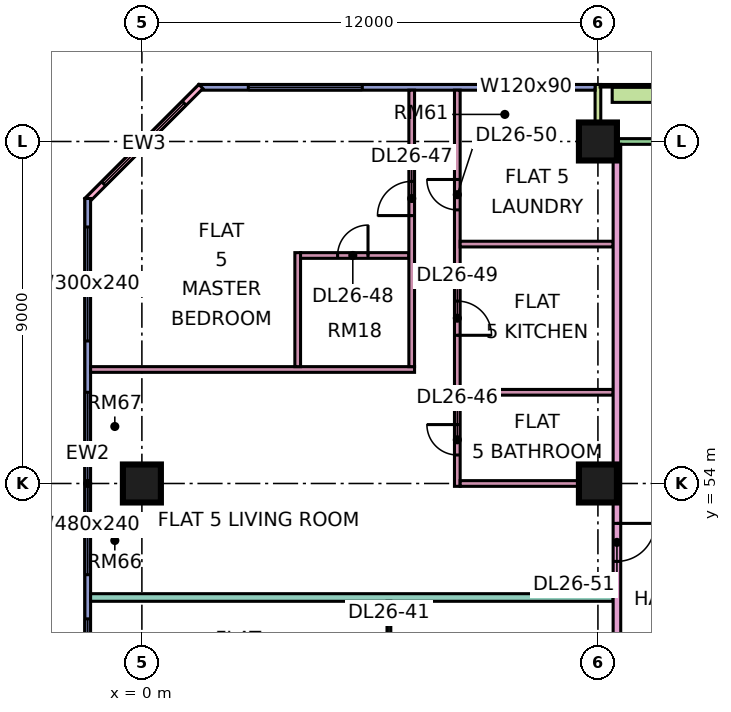
"""IFC4 building model, lengths in metres.
Left out: names, types, materials, properties, quantities, classifications, styles, units other than length and angle.
Written with IfcOpenShell. Run it as: python <this file> out.ifc"""

import sys

from ifc_helpers import new_model, si_unit, direction, frame, frame_2d, origin, origin_2d, place, context, subcontext, project, spatial, rectangle, extrude, element, fill, save


model = new_model("IFC4")
c1 = context("Model", 3, precision=1e-05, world=origin(), true_north=direction((0.0, 1.0)))
c2 = subcontext(c1, "Body", "Model", "MODEL_VIEW")
j1 = project(units=[si_unit("LENGTHUNIT", "METRE"), si_unit("PLANEANGLEUNIT", "RADIAN")], contexts=[c1])
p1 = place(None, origin())
s1 = spatial("IfcSite", under=j1, at=p1, CompositionType="ELEMENT")
p2 = place(p1, origin())
s2 = spatial("IfcBuilding", under=s1, at=p2, CompositionType="ELEMENT")
p3 = place(p2, frame((0.0, 0.0, 114.4)))
s3 = spatial("IfcBuildingStorey", under=s2, at=p3, CompositionType="ELEMENT", Elevation=114.4)
for number, where, z_axis, x_axis in (
    (1, (0.0, 54.0, 0.0), (0.0, 0.0, 1.0), (1.0, 0.0, 0.0)),
    (2, (12.0, 54.0, 0.0), (0.0, 0.0, 1.0), (1.0, 0.0, 0.0)),
    (3, (12.0, 63.0, 0.0), (0.0, 0.0, 1.0), (1.0, 0.0, 0.0)),
):
    element("IfcColumn", number, at=place(p3, frame(where, z_axis=z_axis, x_axis=x_axis)), inside=s3, PredefinedType="COLUMN", context=c2, shape_type="SweptSolid", body=[
        extrude(rectangle(XDim=1.0, YDim=1.0, at=origin_2d()), origin(), (0.0, 0.0, 1.0), 3.75),
    ])
p4 = place(p3, frame((22.425, 63.0, 0.0), z_axis=(0.0, 0.0, 1.0), x_axis=(-1.0, 0.0, 0.0)))
e4 = element("IfcWall", 4, at=p4, inside=s3, PredefinedType="SOLIDWALL", context=c2, shape_type="SweptSolid", body=[
    extrude(rectangle(XDim=10.35, YDim=0.15, at=frame_2d((5.175, 0.0))), origin(), (0.0, 0.0, 1.0), 3.35),
])
p5 = place(p4, frame((0.562, 0.0, 0.45)))
e5 = element("IfcOpeningElement", 5, at=p5, cuts=e4, PredefinedType="OPENING", context=c2, shape_type="SweptSolid", body=[
    extrude(rectangle(XDim=1.8, YDim=2.4, at=frame_2d((0.9, 1.2))), frame((0.0, 0.085, 0.0), z_axis=(0.0, -1.0, 0.0), x_axis=(1.0, 0.0, 0.0)), (0.0, 0.0, 1.0), 0.17),
])
p6 = place(p4, frame((3.975, 0.0, 0.0)))
e6 = element("IfcOpeningElement", 6, at=p6, cuts=e4, PredefinedType="OPENING", context=c2, shape_type="SweptSolid", body=[
    extrude(rectangle(XDim=1.8, YDim=2.4, at=frame_2d((0.9, 1.2))), frame((0.0, 0.085, 0.0), z_axis=(0.0, -1.0, 0.0), x_axis=(1.0, 0.0, 0.0)), (0.0, 0.0, 1.0), 0.17),
])
p7 = place(p3, frame((12.0, 64.5, 0.0), z_axis=(0.0, 0.0, 1.0), x_axis=(0.0, -1.0, 0.0)))
e7 = element("IfcWall", 7, at=p7, inside=s3, PredefinedType="SOLIDWALL", context=c2, shape_type="SweptSolid", body=[
    extrude(rectangle(XDim=1.5, YDim=0.15, at=frame_2d((0.75, 0.0))), origin(), (0.0, 0.0, 1.0), 3.35),
])
p8 = place(p3, frame((11.925, 64.425, 0.0), z_axis=(0.0, 0.0, 1.0), x_axis=(-1.0, 0.0, 0.0)))
e8 = element("IfcWall", 8, at=p8, inside=s3, PredefinedType="SOLIDWALL", context=c2, shape_type="SweptSolid", body=[
    extrude(rectangle(XDim=10.425, YDim=0.15, at=frame_2d((5.212, 0.0))), origin(), (0.0, 0.0, 1.0), 3.35),
])
p9 = place(p8, frame((1.212, 0.0, 1.7)))
e9 = element("IfcOpeningElement", 9, at=p9, cuts=e8, PredefinedType="OPENING", context=c2, shape_type="SweptSolid", body=[
    extrude(rectangle(XDim=1.2, YDim=0.9, at=frame_2d((0.6, 0.45))), frame((0.0, 0.085, 0.0), z_axis=(0.0, -1.0, 0.0), x_axis=(1.0, 0.0, 0.0)), (0.0, 0.0, 1.0), 0.17),
])
p10 = place(p8, frame((6.125, 0.0, 0.45)))
e10 = element("IfcOpeningElement", 10, at=p10, cuts=e8, PredefinedType="OPENING", context=c2, shape_type="SweptSolid", body=[
    extrude(rectangle(XDim=3.0, YDim=2.4, at=frame_2d((1.5, 1.2))), frame((0.0, 0.085, 0.0), z_axis=(0.0, -1.0, 0.0), x_axis=(1.0, 0.0, 0.0)), (0.0, 0.0, 1.0), 0.17),
])
p11 = place(p3, frame((1.553, 64.447, 0.0), z_axis=(0.0, 0.0, 1.0), x_axis=(-0.707106781187, -0.707106781187, 0.0)))
e11 = element("IfcWall", 11, at=p11, inside=s3, PredefinedType="SOLIDWALL", context=c2, shape_type="SweptSolid", body=[
    extrude(rectangle(XDim=4.243, YDim=0.15, at=frame_2d((2.121, 0.0))), origin(), (0.0, 0.0, 1.0), 3.35),
])
p12 = place(p11, frame((0.621, 0.0, 0.45)))
e12 = element("IfcOpeningElement", 12, at=p12, cuts=e11, PredefinedType="OPENING", context=c2, shape_type="SweptSolid", body=[
    extrude(rectangle(XDim=3.0, YDim=2.4, at=frame_2d((1.5, 1.2))), frame((0.0, 0.085, 0.0), z_axis=(0.0, -1.0, 0.0), x_axis=(1.0, 0.0, 0.0)), (0.0, 0.0, 1.0), 0.17),
])
p13 = place(p3, frame((-1.425, 61.5, 0.0), z_axis=(0.0, 0.0, 1.0), x_axis=(0.0, -1.0, 0.0)))
e13 = element("IfcWall", 13, at=p13, inside=s3, PredefinedType="SOLIDWALL", context=c2, shape_type="SweptSolid", body=[
    extrude(rectangle(XDim=13.425, YDim=0.15, at=frame_2d((6.712, 0.0))), origin(), (0.0, 0.0, 1.0), 3.35),
])
p14 = place(p13, frame((0.75, 0.0, 0.45)))
e14 = element("IfcOpeningElement", 14, at=p14, cuts=e13, PredefinedType="OPENING", context=c2, shape_type="SweptSolid", body=[
    extrude(rectangle(XDim=3.0, YDim=2.4, at=frame_2d((1.5, 1.2))), frame((0.0, 0.085, 0.0), z_axis=(0.0, -1.0, 0.0), x_axis=(1.0, 0.0, 0.0)), (0.0, 0.0, 1.0), 0.17),
])
p15 = place(p13, frame((5.1, 0.0, 0.45)))
e15 = element("IfcOpeningElement", 15, at=p15, cuts=e13, PredefinedType="OPENING", context=c2, shape_type="SweptSolid", body=[
    extrude(rectangle(XDim=4.8, YDim=2.4, at=frame_2d((2.4, 1.2))), frame((0.0, 0.085, 0.0), z_axis=(0.0, -1.0, 0.0), x_axis=(1.0, 0.0, 0.0)), (0.0, 0.0, 1.0), 0.17),
])
p16 = place(p13, frame((11.062, 0.0, 0.45)))
e16 = element("IfcOpeningElement", 16, at=p16, cuts=e13, PredefinedType="OPENING", context=c2, shape_type="SweptSolid", body=[
    extrude(rectangle(XDim=1.8, YDim=2.4, at=frame_2d((0.9, 1.2))), frame((0.0, 0.085, 0.0), z_axis=(0.0, -1.0, 0.0), x_axis=(1.0, 0.0, 0.0)), (0.0, 0.0, 1.0), 0.17),
])
p17 = place(p3, frame((22.125, 64.229, 0.0), z_axis=(0.0, 0.0, 1.0), x_axis=(-1.0, 0.0, 0.0)))
e17 = element("IfcWall", 17, at=p17, inside=s3, PredefinedType="SOLIDWALL", context=c2, shape_type="SweptSolid", body=[
    extrude(rectangle(XDim=9.75, YDim=0.4, at=frame_2d((4.875, 0.0))), origin(), (0.0, 0.0, 1.0), 0.7),
])
p18 = place(p3, frame((-1.35, 51.0, 0.0), z_axis=(0.0, 0.0, 1.0), x_axis=(1.0, 0.0, 0.0)))
e18 = element("IfcWall", 18, at=p18, inside=s3, PredefinedType="PARTITIONING", context=c2, shape_type="SweptSolid", body=[
    extrude(rectangle(XDim=13.75, YDim=0.2, at=frame_2d((6.875, 0.0))), origin(), (0.0, 0.0, 1.0), 3.35),
])
p19 = place(p3, frame((-1.35, 57.0, 0.0), z_axis=(0.0, 0.0, 1.0), x_axis=(1.0, 0.0, 0.0)))
e19 = element("IfcWall", 19, at=p19, inside=s3, PredefinedType="PARTITIONING", context=c2, shape_type="SweptSolid", body=[
    extrude(rectangle(XDim=8.525, YDim=0.15, at=frame_2d((4.263, 0.0))), origin(), (0.0, 0.0, 1.0), 3.35),
])
p20 = place(p3, frame((4.1, 57.075, 0.0), z_axis=(0.0, 0.0, 1.0), x_axis=(0.0, 1.0, 0.0)))
e20 = element("IfcWall", 20, at=p20, inside=s3, PredefinedType="PARTITIONING", context=c2, shape_type="SweptSolid", body=[
    extrude(rectangle(XDim=3.0, YDim=0.15, at=frame_2d((1.5, 0.0))), origin(), (0.0, 0.0, 1.0), 3.35),
])
p21 = place(p3, frame((4.175, 60.0, 0.0), z_axis=(0.0, 0.0, 1.0), x_axis=(1.0, 0.0, 0.0)))
e21 = element("IfcWall", 21, at=p21, inside=s3, PredefinedType="PARTITIONING", context=c2, shape_type="SweptSolid", body=[
    extrude(rectangle(XDim=2.85, YDim=0.15, at=frame_2d((1.425, 0.0))), origin(), (0.0, 0.0, 1.0), 3.35),
])
p22 = place(p21, frame((0.975, 0.0, 0.0)))
e22 = element("IfcOpeningElement", 22, at=p22, cuts=e21, PredefinedType="OPENING", context=c2, shape_type="SweptSolid", body=[
    extrude(rectangle(XDim=0.8, YDim=2.1, at=frame_2d((0.4, 1.05))), frame((0.0, 0.085, 0.0), z_axis=(0.0, -1.0, 0.0), x_axis=(1.0, 0.0, 0.0)), (0.0, 0.0, 1.0), 0.17),
])
p23 = place(p3, frame((6.5, 41.95, 0.0), z_axis=(0.0, 0.0, 1.0), x_axis=(0.0, 1.0, 0.0)))
e23 = element("IfcWall", 23, at=p23, inside=s3, PredefinedType="PARTITIONING", context=c2, shape_type="SweptSolid", body=[
    extrude(rectangle(XDim=8.95, YDim=0.1, at=frame_2d((4.475, 0.0))), origin(), (0.0, 0.0, 1.0), 3.35),
])
p24 = place(p23, frame((1.1, 0.0, 0.0)))
e24 = element("IfcOpeningElement", 24, at=p24, cuts=e23, PredefinedType="OPENING", context=c2, shape_type="SweptSolid", body=[
    extrude(rectangle(XDim=0.9, YDim=2.1, at=frame_2d((0.45, 1.05))), frame((0.0, 0.06, 0.0), z_axis=(0.0, -1.0, 0.0), x_axis=(1.0, 0.0, 0.0)), (0.0, 0.0, 1.0), 0.12),
])
p25 = place(p23, frame((7.1, 0.0, 0.0)))
e25 = element("IfcOpeningElement", 25, at=p25, cuts=e23, PredefinedType="OPENING", context=c2, shape_type="SweptSolid", body=[
    extrude(rectangle(XDim=0.9, YDim=2.1, at=frame_2d((0.45, 1.05))), frame((0.0, 0.06, 0.0), z_axis=(0.0, -1.0, 0.0), x_axis=(1.0, 0.0, 0.0)), (0.0, 0.0, 1.0), 0.12),
])
p26 = place(p23, frame((4.1, 0.0, 0.0)))
e26 = element("IfcOpeningElement", 26, at=p26, cuts=e23, PredefinedType="OPENING", context=c2, shape_type="SweptSolid", body=[
    extrude(rectangle(XDim=0.9, YDim=2.1, at=frame_2d((0.45, 1.05))), frame((0.0, 0.06, 0.0), z_axis=(0.0, -1.0, 0.0), x_axis=(1.0, 0.0, 0.0)), (0.0, 0.0, 1.0), 0.12),
])
p27 = place(p3, frame((7.1, 57.075, 0.0), z_axis=(0.0, 0.0, 1.0), x_axis=(0.0, 1.0, 0.0)))
e27 = element("IfcWall", 27, at=p27, inside=s3, PredefinedType="PARTITIONING", context=c2, shape_type="SweptSolid", body=[
    extrude(rectangle(XDim=7.275, YDim=0.15, at=frame_2d((3.638, 0.0))), origin(), (0.0, 0.0, 1.0), 3.35),
])
p28 = place(p27, frame((3.975, 0.0, 0.0)))
e28 = element("IfcOpeningElement", 28, at=p28, cuts=e27, PredefinedType="OPENING", context=c2, shape_type="SweptSolid", body=[
    extrude(rectangle(XDim=0.9, YDim=2.1, at=frame_2d((0.45, 1.05))), frame((0.0, 0.085, 0.0), z_axis=(0.0, -1.0, 0.0), x_axis=(1.0, 0.0, 0.0)), (0.0, 0.0, 1.0), 0.17),
])
p29 = place(p3, frame((8.3, 53.925, 0.0), z_axis=(0.0, 0.0, 1.0), x_axis=(0.0, 1.0, 0.0)))
e29 = element("IfcWall", 29, at=p29, inside=s3, PredefinedType="PARTITIONING", context=c2, shape_type="SweptSolid", body=[
    extrude(rectangle(XDim=10.425, YDim=0.15, at=frame_2d((5.212, 0.0))), origin(), (0.0, 0.0, 1.0), 3.35),
])
p30 = place(p29, frame((0.825, 0.0, 0.0)))
e30 = element("IfcOpeningElement", 30, at=p30, cuts=e29, PredefinedType="OPENING", context=c2, shape_type="SweptSolid", body=[
    extrude(rectangle(XDim=0.8, YDim=2.1, at=frame_2d((0.4, 1.05))), frame((0.0, 0.085, 0.0), z_axis=(0.0, -1.0, 0.0), x_axis=(1.0, 0.0, 0.0)), (0.0, 0.0, 1.0), 0.17),
])
p31 = place(p29, frame((3.975, 0.0, 0.0)))
e31 = element("IfcOpeningElement", 31, at=p31, cuts=e29, PredefinedType="OPENING", context=c2, shape_type="SweptSolid", body=[
    extrude(rectangle(XDim=0.9, YDim=2.1, at=frame_2d((0.45, 1.05))), frame((0.0, 0.085, 0.0), z_axis=(0.0, -1.0, 0.0), x_axis=(1.0, 0.0, 0.0)), (0.0, 0.0, 1.0), 0.17),
])
p32 = place(p29, frame((7.275, 0.0, 0.0)))
e32 = element("IfcOpeningElement", 32, at=p32, cuts=e29, PredefinedType="OPENING", context=c2, shape_type="SweptSolid", body=[
    extrude(rectangle(XDim=0.8, YDim=2.1, at=frame_2d((0.4, 1.05))), frame((0.0, 0.085, 0.0), z_axis=(0.0, -1.0, 0.0), x_axis=(1.0, 0.0, 0.0)), (0.0, 0.0, 1.0), 0.17),
])
for number, where, z_axis, x_axis in (
    (33, (8.375, 54.0, 0.0), (0.0, 0.0, 1.0), (1.0, 0.0, 0.0)),
    (34, (8.375, 56.4, 0.0), (0.0, 0.0, 1.0), (1.0, 0.0, 0.0)),
    (35, (8.375, 60.3, 0.0), (0.0, 0.0, 1.0), (1.0, 0.0, 0.0)),
):
    element("IfcWall", number, at=place(p3, frame(where, z_axis=z_axis, x_axis=x_axis)), inside=s3, PredefinedType="PARTITIONING", context=c2, shape_type="SweptSolid", body=[
        extrude(rectangle(XDim=4.025, YDim=0.15, at=frame_2d((2.012, 0.0))), origin(), (0.0, 0.0, 1.0), 3.35),
    ])
p33 = place(p3, frame((12.5, 20.0, 0.0), z_axis=(0.0, 0.0, 1.0), x_axis=(0.0, 1.0, 0.0)))
e36 = element("IfcWall", 36, at=p33, inside=s3, PredefinedType="PARTITIONING", context=c2, shape_type="SweptSolid", body=[
    extrude(rectangle(XDim=42.926, YDim=0.2, at=frame_2d((21.463, 0.0))), origin(), (0.0, 0.0, 1.0), 3.35),
])
p34 = place(p33, frame((28.65, 0.0, 0.0)))
e37 = element("IfcOpeningElement", 37, at=p34, cuts=e36, PredefinedType="OPENING", context=c2, shape_type="SweptSolid", body=[
    extrude(rectangle(XDim=1.0, YDim=2.1, at=frame_2d((0.5, 1.05))), frame((0.0, 0.11, 0.0), z_axis=(0.0, -1.0, 0.0), x_axis=(1.0, 0.0, 0.0)), (0.0, 0.0, 1.0), 0.22),
])
p35 = place(p33, frame((31.95, 0.0, 0.0)))
e38 = element("IfcOpeningElement", 38, at=p35, cuts=e36, PredefinedType="OPENING", context=c2, shape_type="SweptSolid", body=[
    extrude(rectangle(XDim=1.0, YDim=2.1, at=frame_2d((0.5, 1.05))), frame((0.0, 0.11, 0.0), z_axis=(0.0, -1.0, 0.0), x_axis=(1.0, 0.0, 0.0)), (0.0, 0.0, 1.0), 0.22),
])
p36 = place(p33, frame((0.6, 0.0, 0.0)))
e39 = element("IfcOpeningElement", 39, at=p36, cuts=e36, PredefinedType="OPENING", context=c2, shape_type="SweptSolid", body=[
    extrude(rectangle(XDim=1.2, YDim=2.1, at=frame_2d((0.6, 1.05))), frame((0.0, 0.11, 0.0), z_axis=(0.0, -1.0, 0.0), x_axis=(1.0, 0.0, 0.0)), (0.0, 0.0, 1.0), 0.22),
])
p37 = place(p33, frame((4.65, 0.0, 0.0)))
e40 = element("IfcOpeningElement", 40, at=p37, cuts=e36, PredefinedType="OPENING", context=c2, shape_type="SweptSolid", body=[
    extrude(rectangle(XDim=1.0, YDim=2.1, at=frame_2d((0.5, 1.05))), frame((0.0, 0.11, 0.0), z_axis=(0.0, -1.0, 0.0), x_axis=(1.0, 0.0, 0.0)), (0.0, 0.0, 1.0), 0.22),
])
p38 = place(p9, origin())
e41 = element("IfcWindow", 41, at=p38, inside=s3, PartitioningType="SINGLE_PANEL", PredefinedType="WINDOW", context=c2, shape_type="SweptSolid", body=[
    extrude(rectangle(XDim=1.2, YDim=0.9, at=frame_2d((0.6, 0.45))), frame((0.0, 0.03, 0.0), z_axis=(0.0, -1.0, 0.0), x_axis=(1.0, 0.0, 0.0)), (0.0, 0.0, 1.0), 0.06),
])
fill(e9, e41)
p39 = place(p10, origin())
e42 = element("IfcWindow", 42, at=p39, inside=s3, PartitioningType="SINGLE_PANEL", PredefinedType="WINDOW", context=c2, shape_type="SweptSolid", body=[
    extrude(rectangle(XDim=3.0, YDim=2.4, at=frame_2d((1.5, 1.2))), frame((0.0, 0.03, 0.0), z_axis=(0.0, -1.0, 0.0), x_axis=(1.0, 0.0, 0.0)), (0.0, 0.0, 1.0), 0.06),
])
fill(e10, e42)
p40 = place(p12, origin())
e43 = element("IfcWindow", 43, at=p40, inside=s3, PartitioningType="SINGLE_PANEL", PredefinedType="WINDOW", context=c2, shape_type="SweptSolid", body=[
    extrude(rectangle(XDim=3.0, YDim=2.4, at=frame_2d((1.5, 1.2))), frame((0.0, 0.03, 0.0), z_axis=(0.0, -1.0, 0.0), x_axis=(1.0, 0.0, 0.0)), (0.0, 0.0, 1.0), 0.06),
])
fill(e12, e43)
p41 = place(p14, origin())
e44 = element("IfcWindow", 44, at=p41, inside=s3, PartitioningType="SINGLE_PANEL", PredefinedType="WINDOW", context=c2, shape_type="SweptSolid", body=[
    extrude(rectangle(XDim=3.0, YDim=2.4, at=frame_2d((1.5, 1.2))), frame((0.0, 0.03, 0.0), z_axis=(0.0, -1.0, 0.0), x_axis=(1.0, 0.0, 0.0)), (0.0, 0.0, 1.0), 0.06),
])
fill(e14, e44)
p42 = place(p15, origin())
e45 = element("IfcWindow", 45, at=p42, inside=s3, PartitioningType="SINGLE_PANEL", PredefinedType="WINDOW", context=c2, shape_type="SweptSolid", body=[
    extrude(rectangle(XDim=4.8, YDim=2.4, at=frame_2d((2.4, 1.2))), frame((0.0, 0.03, 0.0), z_axis=(0.0, -1.0, 0.0), x_axis=(1.0, 0.0, 0.0)), (0.0, 0.0, 1.0), 0.06),
])
fill(e15, e45)
p43 = place(p16, origin())
e46 = element("IfcWindow", 46, at=p43, inside=s3, PartitioningType="SINGLE_PANEL", PredefinedType="WINDOW", context=c2, shape_type="SweptSolid", body=[
    extrude(rectangle(XDim=1.8, YDim=2.4, at=frame_2d((0.9, 1.2))), frame((0.0, 0.03, 0.0), z_axis=(0.0, -1.0, 0.0), x_axis=(1.0, 0.0, 0.0)), (0.0, 0.0, 1.0), 0.06),
])
fill(e16, e46)
p44 = place(p30, frame((0.8, 0.0, 0.0), z_axis=(0.0, 0.0, 1.0), x_axis=(-1.0, 0.0, 0.0)))
e47 = element("IfcDoor", 47, at=p44, inside=s3, OperationType="SINGLE_SWING_RIGHT", PredefinedType="DOOR", context=c2, shape_type="SweptSolid", body=[
    extrude(rectangle(XDim=0.8, YDim=2.1, at=frame_2d((0.4, 1.05))), frame((0.0, 0.025, 0.0), z_axis=(0.0, -1.0, 0.0), x_axis=(1.0, 0.0, 0.0)), (0.0, 0.0, 1.0), 0.05),
])
fill(e30, e47)
p45 = place(p28, origin())
e48 = element("IfcDoor", 48, at=p45, inside=s3, OperationType="SINGLE_SWING_LEFT", PredefinedType="DOOR", context=c2, shape_type="SweptSolid", body=[
    extrude(rectangle(XDim=0.9, YDim=2.1, at=frame_2d((0.45, 1.05))), frame((0.0, 0.025, 0.0), z_axis=(0.0, -1.0, 0.0), x_axis=(1.0, 0.0, 0.0)), (0.0, 0.0, 1.0), 0.05),
])
fill(e28, e48)
p46 = place(p22, frame((0.8, 0.0, 0.0), z_axis=(0.0, 0.0, 1.0), x_axis=(-1.0, 0.0, 0.0)))
e49 = element("IfcDoor", 49, at=p46, inside=s3, OperationType="SINGLE_SWING_RIGHT", PredefinedType="DOOR", context=c2, shape_type="SweptSolid", body=[
    extrude(rectangle(XDim=0.8, YDim=2.1, at=frame_2d((0.4, 1.05))), frame((0.0, 0.025, 0.0), z_axis=(0.0, -1.0, 0.0), x_axis=(1.0, 0.0, 0.0)), (0.0, 0.0, 1.0), 0.05),
])
fill(e22, e49)
p47 = place(p31, frame((0.9, 0.0, 0.0), z_axis=(0.0, 0.0, 1.0), x_axis=(-1.0, 0.0, 0.0)))
e50 = element("IfcDoor", 50, at=p47, inside=s3, OperationType="SINGLE_SWING_LEFT", PredefinedType="DOOR", context=c2, shape_type="SweptSolid", body=[
    extrude(rectangle(XDim=0.9, YDim=2.1, at=frame_2d((0.45, 1.05))), frame((0.0, 0.025, 0.0), z_axis=(0.0, -1.0, 0.0), x_axis=(1.0, 0.0, 0.0)), (0.0, 0.0, 1.0), 0.05),
])
fill(e31, e50)
p48 = place(p32, frame((0.8, 0.0, 0.0), z_axis=(0.0, 0.0, 1.0), x_axis=(-1.0, 0.0, 0.0)))
e51 = element("IfcDoor", 51, at=p48, inside=s3, OperationType="SINGLE_SWING_RIGHT", PredefinedType="DOOR", context=c2, shape_type="SweptSolid", body=[
    extrude(rectangle(XDim=0.8, YDim=2.1, at=frame_2d((0.4, 1.05))), frame((0.0, 0.025, 0.0), z_axis=(0.0, -1.0, 0.0), x_axis=(1.0, 0.0, 0.0)), (0.0, 0.0, 1.0), 0.05),
])
fill(e32, e51)
p49 = place(p35, origin())
e52 = element("IfcDoor", 52, at=p49, inside=s3, OperationType="SINGLE_SWING_RIGHT", PredefinedType="DOOR", context=c2, shape_type="SweptSolid", body=[
    extrude(rectangle(XDim=1.0, YDim=2.1, at=frame_2d((0.5, 1.05))), frame((0.0, 0.025, 0.0), z_axis=(0.0, -1.0, 0.0), x_axis=(1.0, 0.0, 0.0)), (0.0, 0.0, 1.0), 0.05),
])
fill(e38, e52)
save(model, sys.argv[1])
